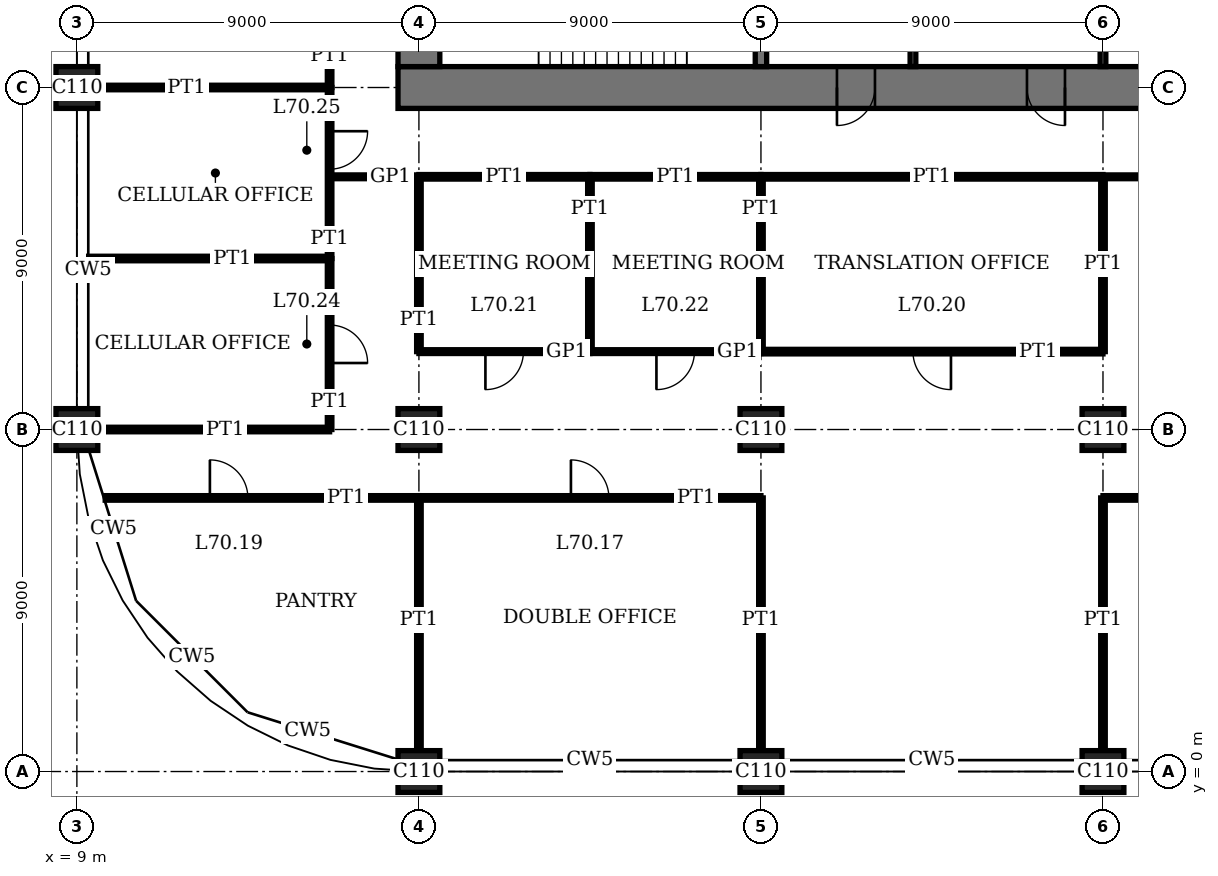
"""IFC4 building model, lengths in metres.
Left out: names, types, materials, properties, quantities, classifications, styles, units other than length and angle.
Written with IfcOpenShell. Run it as: python <this file> out.ifc"""

import sys

from ifc_helpers import new_model, si_unit, direction, frame, frame_2d, origin, origin_2d, place, context, subcontext, project, spatial, rectangle, extrude, element, fill, save


model = new_model("IFC4")
c1 = context("Model", 3, precision=1e-05, world=origin(), true_north=direction((0.0, 1.0)))
c2 = subcontext(c1, "Body", "Model", "MODEL_VIEW")
j1 = project(units=[si_unit("LENGTHUNIT", "METRE"), si_unit("PLANEANGLEUNIT", "RADIAN")], contexts=[c1])
p1 = place(None, origin())
s1 = spatial("IfcSite", under=j1, at=p1, CompositionType="ELEMENT")
p2 = place(p1, origin())
s2 = spatial("IfcBuilding", under=s1, at=p2, CompositionType="ELEMENT")
p3 = place(p2, frame((0.0, 0.0, 287.4)))
s3 = spatial("IfcBuildingStorey", under=s2, at=p3, CompositionType="ELEMENT", Elevation=287.4)
for number, where, z_axis, x_axis in (
    (1, (9.0, 9.0, 0.0), (0.0, 0.0, 1.0), (1.0, 0.0, 0.0)),
    (2, (9.0, 18.0, 0.0), (0.0, 0.0, 1.0), (1.0, 0.0, 0.0)),
    (3, (18.0, 0.0, 0.0), (0.0, 0.0, 1.0), (1.0, 0.0, 0.0)),
    (4, (18.0, 9.0, 0.0), (0.0, 0.0, 1.0), (1.0, 0.0, 0.0)),
    (5, (27.0, 0.0, 0.0), (0.0, 0.0, 1.0), (1.0, 0.0, 0.0)),
    (6, (27.0, 9.0, 0.0), (0.0, 0.0, 1.0), (1.0, 0.0, 0.0)),
    (7, (36.0, 0.0, 0.0), (0.0, 0.0, 1.0), (1.0, 0.0, 0.0)),
    (8, (36.0, 9.0, 0.0), (0.0, 0.0, 1.0), (1.0, 0.0, 0.0)),
):
    element("IfcColumn", number, at=place(p3, frame(where, z_axis=z_axis, x_axis=x_axis)), inside=s3, PredefinedType="COLUMN", context=c2, shape_type="SweptSolid", body=[
        extrude(rectangle(XDim=1.1, YDim=1.1, at=origin_2d()), origin(), (0.0, 0.0, 1.0), 4.0),
    ])
p4 = place(p3, frame((17.45, 18.0, 0.0), z_axis=(0.0, 0.0, 1.0), x_axis=(1.0, 0.0, 0.0)))
e9 = element("IfcWall", 9, at=p4, inside=s3, PredefinedType="SHEAR", context=c2, shape_type="SweptSolid", body=[
    extrude(rectangle(XDim=28.1, YDim=1.1, at=frame_2d((14.05, 0.0))), origin(), (0.0, 0.0, 1.0), 4.0),
])
p5 = place(p4, frame((11.55, 0.0, 0.0)))
e10 = element("IfcOpeningElement", 10, at=p5, cuts=e9, PredefinedType="OPENING", context=c2, shape_type="SweptSolid", body=[
    extrude(rectangle(XDim=1.0, YDim=2.4, at=frame_2d((0.5, 1.2))), frame((0.0, 0.56, 0.0), z_axis=(0.0, -1.0, 0.0), x_axis=(1.0, 0.0, 0.0)), (0.0, 0.0, 1.0), 1.12),
])
p6 = place(p4, frame((16.55, 0.0, 0.0)))
e11 = element("IfcOpeningElement", 11, at=p6, cuts=e9, PredefinedType="OPENING", context=c2, shape_type="SweptSolid", body=[
    extrude(rectangle(XDim=1.0, YDim=2.4, at=frame_2d((0.5, 1.2))), frame((0.0, 0.56, 0.0), z_axis=(0.0, -1.0, 0.0), x_axis=(1.0, 0.0, 0.0)), (0.0, 0.0, 1.0), 1.12),
])
p7 = place(p4, frame((20.0, 0.0, 0.0)))
e12 = element("IfcOpeningElement", 12, at=p7, cuts=e9, PredefinedType="OPENING", context=c2, shape_type="SweptSolid", body=[
    extrude(rectangle(XDim=1.1, YDim=2.4, at=frame_2d((0.55, 1.2))), frame((0.0, 0.56, 0.0), z_axis=(0.0, -1.0, 0.0), x_axis=(1.0, 0.0, 0.0)), (0.0, 0.0, 1.0), 1.12),
])
p8 = place(p4, frame((24.05, 0.0, 0.0)))
e13 = element("IfcOpeningElement", 13, at=p8, cuts=e9, PredefinedType="OPENING", context=c2, shape_type="SweptSolid", body=[
    extrude(rectangle(XDim=1.0, YDim=2.4, at=frame_2d((0.5, 1.2))), frame((0.0, 0.56, 0.0), z_axis=(0.0, -1.0, 0.0), x_axis=(1.0, 0.0, 0.0)), (0.0, 0.0, 1.0), 1.12),
])
p9 = place(p3, frame((18.0, 35.45, 0.0), z_axis=(0.0, 0.0, 1.0), x_axis=(0.0, -1.0, 0.0)))
e14 = element("IfcWall", 14, at=p9, inside=s3, PredefinedType="SHEAR", context=c2, shape_type="SweptSolid", body=[
    extrude(rectangle(XDim=16.9, YDim=1.1, at=frame_2d((8.45, 0.0))), origin(), (0.0, 0.0, 1.0), 4.0),
])
p10 = place(p9, frame((8.45, 0.0, 0.0)))
e15 = element("IfcOpeningElement", 15, at=p10, cuts=e14, PredefinedType="OPENING", context=c2, shape_type="SweptSolid", body=[
    extrude(rectangle(XDim=1.8, YDim=2.4, at=frame_2d((0.9, 1.2))), frame((0.0, 0.56, 0.0), z_axis=(0.0, -1.0, 0.0), x_axis=(1.0, 0.0, 0.0)), (0.0, 0.0, 1.0), 1.12),
])
p11 = place(p3, frame((27.0, 18.55, 0.0), z_axis=(0.0, 0.0, 1.0), x_axis=(0.0, 1.0, 0.0)))
e16 = element("IfcWall", 16, at=p11, inside=s3, PredefinedType="SHEAR", context=c2, shape_type="SweptSolid", body=[
    extrude(rectangle(XDim=3.05, YDim=0.3, at=frame_2d((1.525, 0.0))), origin(), (0.0, 0.0, 1.0), 4.0),
])
p12 = place(p3, frame((18.0, 7.2, 0.0), z_axis=(0.0, 0.0, 1.0), x_axis=(1.0, 0.0, 0.0)))
e17 = element("IfcWall", 17, at=p12, inside=s3, PredefinedType="PARTITIONING", context=c2, shape_type="SweptSolid", body=[
    extrude(rectangle(XDim=9.0, YDim=0.12, at=frame_2d((4.5, 0.0))), origin(), (0.0, 0.0, 1.0), 3.75),
])
p13 = place(p12, frame((4.0, 0.0, 0.0)))
e18 = element("IfcOpeningElement", 18, at=p13, cuts=e17, PredefinedType="OPENING", context=c2, shape_type="SweptSolid", body=[
    extrude(rectangle(XDim=1.0, YDim=2.4, at=frame_2d((0.5, 1.2))), frame((0.0, 0.07, 0.0), z_axis=(0.0, -1.0, 0.0), x_axis=(1.0, 0.0, 0.0)), (0.0, 0.0, 1.0), 0.14),
])
p14 = place(p3, frame((36.0, 7.2, 0.0), z_axis=(0.0, 0.0, 1.0), x_axis=(1.0, 0.0, 0.0)))
e19 = element("IfcWall", 19, at=p14, inside=s3, PredefinedType="PARTITIONING", context=c2, shape_type="SweptSolid", body=[
    extrude(rectangle(XDim=9.0, YDim=0.12, at=frame_2d((4.5, 0.0))), origin(), (0.0, 0.0, 1.0), 3.75),
])
p15 = place(p14, frame((4.0, 0.0, 0.0)))
e20 = element("IfcOpeningElement", 20, at=p15, cuts=e19, PredefinedType="OPENING", context=c2, shape_type="SweptSolid", body=[
    extrude(rectangle(XDim=1.0, YDim=2.4, at=frame_2d((0.5, 1.2))), frame((0.0, 0.07, 0.0), z_axis=(0.0, -1.0, 0.0), x_axis=(1.0, 0.0, 0.0)), (0.0, 0.0, 1.0), 0.14),
])
p16 = place(p3, frame((9.745, 7.2, 0.0), z_axis=(0.0, 0.0, 1.0), x_axis=(1.0, 0.0, 0.0)))
e21 = element("IfcWall", 21, at=p16, inside=s3, PredefinedType="PARTITIONING", context=c2, shape_type="SweptSolid", body=[
    extrude(rectangle(XDim=8.255, YDim=0.12, at=frame_2d((4.127, 0.0))), origin(), (0.0, 0.0, 1.0), 3.75),
])
p17 = place(p16, frame((2.755, 0.0, 0.0)))
e22 = element("IfcOpeningElement", 22, at=p17, cuts=e21, PredefinedType="OPENING", context=c2, shape_type="SweptSolid", body=[
    extrude(rectangle(XDim=1.0, YDim=2.4, at=frame_2d((0.5, 1.2))), frame((0.0, 0.07, 0.0), z_axis=(0.0, -1.0, 0.0), x_axis=(1.0, 0.0, 0.0)), (0.0, 0.0, 1.0), 0.14),
])
p18 = place(p3, frame((9.55, 9.0, 0.0), z_axis=(0.0, 0.0, 1.0), x_axis=(1.0, 0.0, 0.0)))
e23 = element("IfcWall", 23, at=p18, inside=s3, PredefinedType="PARTITIONING", context=c2, shape_type="SweptSolid", body=[
    extrude(rectangle(XDim=6.1, YDim=0.12, at=frame_2d((3.05, 0.0))), origin(), (0.0, 0.0, 1.0), 3.05),
])
p19 = place(p3, frame((27.0, 11.05, 0.0), z_axis=(0.0, 0.0, 1.0), x_axis=(1.0, 0.0, 0.0)))
e24 = element("IfcWall", 24, at=p19, inside=s3, PredefinedType="PARTITIONING", context=c2, shape_type="SweptSolid", body=[
    extrude(rectangle(XDim=9.0, YDim=0.12, at=frame_2d((4.5, 0.0))), origin(), (0.0, 0.0, 1.0), 3.75),
])
p20 = place(p19, frame((4.0, 0.0, 0.0)))
e25 = element("IfcOpeningElement", 25, at=p20, cuts=e24, PredefinedType="OPENING", context=c2, shape_type="SweptSolid", body=[
    extrude(rectangle(XDim=1.0, YDim=2.4, at=frame_2d((0.5, 1.2))), frame((0.0, 0.07, 0.0), z_axis=(0.0, -1.0, 0.0), x_axis=(1.0, 0.0, 0.0)), (0.0, 0.0, 1.0), 0.14),
])
p21 = place(p3, frame((18.0, 11.05, 0.0), z_axis=(0.0, 0.0, 1.0), x_axis=(1.0, 0.0, 0.0)))
e26 = element("IfcWall", 26, at=p21, inside=s3, PredefinedType="PARTITIONING", context=c2, shape_type="SweptSolid", body=[
    extrude(rectangle(XDim=4.5, YDim=0.1, at=frame_2d((2.25, 0.0))), origin(), (0.0, 0.0, 1.0), 3.75),
])
p22 = place(p21, frame((1.75, 0.0, 0.0)))
e27 = element("IfcOpeningElement", 27, at=p22, cuts=e26, PredefinedType="OPENING", context=c2, shape_type="SweptSolid", body=[
    extrude(rectangle(XDim=1.0, YDim=2.4, at=frame_2d((0.5, 1.2))), frame((0.0, 0.06, 0.0), z_axis=(0.0, -1.0, 0.0), x_axis=(1.0, 0.0, 0.0)), (0.0, 0.0, 1.0), 0.12),
])
p23 = place(p3, frame((22.5, 11.05, 0.0), z_axis=(0.0, 0.0, 1.0), x_axis=(1.0, 0.0, 0.0)))
e28 = element("IfcWall", 28, at=p23, inside=s3, PredefinedType="PARTITIONING", context=c2, shape_type="SweptSolid", body=[
    extrude(rectangle(XDim=4.5, YDim=0.1, at=frame_2d((2.25, 0.0))), origin(), (0.0, 0.0, 1.0), 3.75),
])
p24 = place(p23, frame((1.75, 0.0, 0.0)))
e29 = element("IfcOpeningElement", 29, at=p24, cuts=e28, PredefinedType="OPENING", context=c2, shape_type="SweptSolid", body=[
    extrude(rectangle(XDim=1.0, YDim=2.4, at=frame_2d((0.5, 1.2))), frame((0.0, 0.06, 0.0), z_axis=(0.0, -1.0, 0.0), x_axis=(1.0, 0.0, 0.0)), (0.0, 0.0, 1.0), 0.12),
])
p25 = place(p3, frame((9.31, 13.5, 0.0), z_axis=(0.0, 0.0, 1.0), x_axis=(1.0, 0.0, 0.0)))
e30 = element("IfcWall", 30, at=p25, inside=s3, PredefinedType="PARTITIONING", context=c2, shape_type="SweptSolid", body=[
    extrude(rectangle(XDim=6.34, YDim=0.12, at=frame_2d((3.17, 0.0))), origin(), (0.0, 0.0, 1.0), 3.1),
])
p26 = place(p3, frame((27.0, 15.65, 0.0), z_axis=(0.0, 0.0, 1.0), x_axis=(1.0, 0.0, 0.0)))
e31 = element("IfcWall", 31, at=p26, inside=s3, PredefinedType="PARTITIONING", context=c2, shape_type="SweptSolid", body=[
    extrude(rectangle(XDim=9.0, YDim=0.12, at=frame_2d((4.5, 0.0))), origin(), (0.0, 0.0, 1.0), 3.75),
])
for number, where, z_axis, x_axis in (
    (32, (18.0, 15.65, 0.0), (0.0, 0.0, 1.0), (1.0, 0.0, 0.0)),
    (33, (22.5, 15.65, 0.0), (0.0, 0.0, 1.0), (1.0, 0.0, 0.0)),
):
    element("IfcWall", number, at=place(p3, frame(where, z_axis=z_axis, x_axis=x_axis)), inside=s3, PredefinedType="PARTITIONING", context=c2, shape_type="SweptSolid", body=[
        extrude(rectangle(XDim=4.5, YDim=0.12, at=frame_2d((2.25, 0.0))), origin(), (0.0, 0.0, 1.0), 3.75),
    ])
p27 = place(p3, frame((36.01, 15.65, 0.0), z_axis=(0.0, 0.0, 1.0), x_axis=(1.0, 0.0, 0.0)))
e34 = element("IfcWall", 34, at=p27, inside=s3, PredefinedType="PARTITIONING", context=c2, shape_type="SweptSolid", body=[
    extrude(rectangle(XDim=11.33, YDim=0.1, at=frame_2d((5.665, 0.0))), origin(), (0.0, 0.0, 1.0), 3.75),
])
p28 = place(p27, frame((5.165, 0.0, 0.0)))
e35 = element("IfcOpeningElement", 35, at=p28, cuts=e34, PredefinedType="OPENING", context=c2, shape_type="SweptSolid", body=[
    extrude(rectangle(XDim=1.0, YDim=2.4, at=frame_2d((0.5, 1.2))), frame((0.0, 0.06, 0.0), z_axis=(0.0, -1.0, 0.0), x_axis=(1.0, 0.0, 0.0)), (0.0, 0.0, 1.0), 0.12),
])
p29 = place(p3, frame((15.66, 15.65, 0.0), z_axis=(0.0, 0.0, 1.0), x_axis=(1.0, 0.0, 0.0)))
e36 = element("IfcWall", 36, at=p29, inside=s3, PredefinedType="PARTITIONING", context=c2, shape_type="SweptSolid", body=[
    extrude(rectangle(XDim=2.33, YDim=0.1, at=frame_2d((1.165, 0.0))), origin(), (0.0, 0.0, 1.0), 3.75),
])
p30 = place(p3, frame((9.55, 18.0, 0.0), z_axis=(0.0, 0.0, 1.0), x_axis=(1.0, 0.0, 0.0)))
e37 = element("IfcWall", 37, at=p30, inside=s3, PredefinedType="PARTITIONING", context=c2, shape_type="SweptSolid", body=[
    extrude(rectangle(XDim=6.1, YDim=0.12, at=frame_2d((3.05, 0.0))), origin(), (0.0, 0.0, 1.0), 3.05),
])
p31 = place(p3, frame((15.65, 9.0, 0.0), z_axis=(0.0, 0.0, 1.0), x_axis=(0.0, 1.0, 0.0)))
e38 = element("IfcWall", 38, at=p31, inside=s3, PredefinedType="PARTITIONING", context=c2, shape_type="SweptSolid", body=[
    extrude(rectangle(XDim=4.5, YDim=0.12, at=frame_2d((2.25, 0.0))), origin(), (0.0, 0.0, 1.0), 3.75),
])
p32 = place(p31, frame((1.75, 0.0, 0.0)))
e39 = element("IfcOpeningElement", 39, at=p32, cuts=e38, PredefinedType="OPENING", context=c2, shape_type="SweptSolid", body=[
    extrude(rectangle(XDim=1.0, YDim=2.4, at=frame_2d((0.5, 1.2))), frame((0.0, 0.07, 0.0), z_axis=(0.0, -1.0, 0.0), x_axis=(1.0, 0.0, 0.0)), (0.0, 0.0, 1.0), 0.14),
])
p33 = place(p3, frame((15.65, 13.5, 0.0), z_axis=(0.0, 0.0, 1.0), x_axis=(0.0, 1.0, 0.0)))
e40 = element("IfcWall", 40, at=p33, inside=s3, PredefinedType="PARTITIONING", context=c2, shape_type="SweptSolid", body=[
    extrude(rectangle(XDim=4.5, YDim=0.12, at=frame_2d((2.25, 0.0))), origin(), (0.0, 0.0, 1.0), 3.75),
])
p34 = place(p33, frame((2.35, 0.0, 0.0)))
e41 = element("IfcOpeningElement", 41, at=p34, cuts=e40, PredefinedType="OPENING", context=c2, shape_type="SweptSolid", body=[
    extrude(rectangle(XDim=1.0, YDim=2.4, at=frame_2d((0.5, 1.2))), frame((0.0, 0.07, 0.0), z_axis=(0.0, -1.0, 0.0), x_axis=(1.0, 0.0, 0.0)), (0.0, 0.0, 1.0), 0.14),
])
p35 = place(p3, frame((15.65, 18.0, 0.0), z_axis=(0.0, 0.0, 1.0), x_axis=(0.0, 1.0, 0.0)))
e42 = element("IfcWall", 42, at=p35, inside=s3, PredefinedType="PARTITIONING", context=c2, shape_type="SweptSolid", body=[
    extrude(rectangle(XDim=4.5, YDim=0.12, at=frame_2d((2.25, 0.0))), origin(), (0.0, 0.0, 1.0), 3.75),
])
p36 = place(p35, frame((1.75, 0.0, 0.0)))
e43 = element("IfcOpeningElement", 43, at=p36, cuts=e42, PredefinedType="OPENING", context=c2, shape_type="SweptSolid", body=[
    extrude(rectangle(XDim=1.0, YDim=2.4, at=frame_2d((0.5, 1.2))), frame((0.0, 0.07, 0.0), z_axis=(0.0, -1.0, 0.0), x_axis=(1.0, 0.0, 0.0)), (0.0, 0.0, 1.0), 0.14),
])
p37 = place(p3, frame((18.0, 0.55, 0.0), z_axis=(0.0, 0.0, 1.0), x_axis=(0.0, 1.0, 0.0)))
e44 = element("IfcWall", 44, at=p37, inside=s3, PredefinedType="PARTITIONING", context=c2, shape_type="SweptSolid", body=[
    extrude(rectangle(XDim=6.65, YDim=0.12, at=frame_2d((3.325, 0.0))), origin(), (0.0, 0.0, 1.0), 3.05),
])
p38 = place(p3, frame((18.0, 11.05, 0.0), z_axis=(0.0, 0.0, 1.0), x_axis=(0.0, 1.0, 0.0)))
e45 = element("IfcWall", 45, at=p38, inside=s3, PredefinedType="PARTITIONING", context=c2, shape_type="SweptSolid", body=[
    extrude(rectangle(XDim=4.6, YDim=0.12, at=frame_2d((2.3, 0.0))), origin(), (0.0, 0.0, 1.0), 3.05),
])
p39 = place(p3, frame((22.5, 11.05, 0.0), z_axis=(0.0, 0.0, 1.0), x_axis=(0.0, 1.0, 0.0)))
e46 = element("IfcWall", 46, at=p39, inside=s3, PredefinedType="PARTITIONING", context=c2, shape_type="SweptSolid", body=[
    extrude(rectangle(XDim=4.6, YDim=0.12, at=frame_2d((2.3, 0.0))), origin(), (0.0, 0.0, 1.0), 3.75),
])
p40 = place(p3, frame((27.0, 0.55, 0.0), z_axis=(0.0, 0.0, 1.0), x_axis=(0.0, 1.0, 0.0)))
e47 = element("IfcWall", 47, at=p40, inside=s3, PredefinedType="PARTITIONING", context=c2, shape_type="SweptSolid", body=[
    extrude(rectangle(XDim=6.65, YDim=0.12, at=frame_2d((3.325, 0.0))), origin(), (0.0, 0.0, 1.0), 3.05),
])
p41 = place(p3, frame((27.0, 11.05, 0.0), z_axis=(0.0, 0.0, 1.0), x_axis=(0.0, 1.0, 0.0)))
e48 = element("IfcWall", 48, at=p41, inside=s3, PredefinedType="PARTITIONING", context=c2, shape_type="SweptSolid", body=[
    extrude(rectangle(XDim=4.6, YDim=0.12, at=frame_2d((2.3, 0.0))), origin(), (0.0, 0.0, 1.0), 3.05),
])
p42 = place(p3, frame((36.0, 0.55, 0.0), z_axis=(0.0, 0.0, 1.0), x_axis=(0.0, 1.0, 0.0)))
e49 = element("IfcWall", 49, at=p42, inside=s3, PredefinedType="PARTITIONING", context=c2, shape_type="SweptSolid", body=[
    extrude(rectangle(XDim=6.65, YDim=0.12, at=frame_2d((3.325, 0.0))), origin(), (0.0, 0.0, 1.0), 3.05),
])
p43 = place(p3, frame((36.0, 11.05, 0.0), z_axis=(0.0, 0.0, 1.0), x_axis=(0.0, 1.0, 0.0)))
e50 = element("IfcWall", 50, at=p43, inside=s3, PredefinedType="PARTITIONING", context=c2, shape_type="SweptSolid", body=[
    extrude(rectangle(XDim=4.6, YDim=0.12, at=frame_2d((2.3, 0.0))), origin(), (0.0, 0.0, 1.0), 3.05),
])
for number, where, z_axis, x_axis in (
    (51, (31.0, 18.55, 0.0), (0.0, 0.0, 1.0), (0.0, 1.0, 0.0)),
    (52, (36.0, 18.55, 0.0), (0.0, 0.0, 1.0), (0.0, 1.0, 0.0)),
):
    element("IfcWall", number, at=place(p3, frame(where, z_axis=z_axis, x_axis=x_axis)), inside=s3, PredefinedType="PARTITIONING", context=c2, shape_type="SweptSolid", body=[
        extrude(rectangle(XDim=2.9, YDim=0.15, at=frame_2d((1.45, 0.0))), origin(), (0.0, 0.0, 1.0), 3.75),
    ])
p44 = place(p5, origin())
e53 = element("IfcDoor", 53, at=p44, inside=s3, OperationType="SINGLE_SWING_LEFT", PredefinedType="DOOR", context=c2, shape_type="SweptSolid", body=[
    extrude(rectangle(XDim=1.0, YDim=2.4, at=frame_2d((0.5, 1.2))), frame((0.0, 0.025, 0.0), z_axis=(0.0, -1.0, 0.0), x_axis=(1.0, 0.0, 0.0)), (0.0, 0.0, 1.0), 0.05),
    extrude(rectangle(XDim=0.04, YDim=2.4, at=frame_2d((0.02, 1.2))), frame((0.0, 0.4, 0.0), z_axis=(0.0, -1.0, 0.0), x_axis=(1.0, 0.0, 0.0)), (0.0, 0.0, 1.0), 0.8),
    extrude(rectangle(XDim=0.04, YDim=2.4, at=frame_2d((0.98, 1.2))), frame((0.0, 0.4, 0.0), z_axis=(0.0, -1.0, 0.0), x_axis=(1.0, 0.0, 0.0)), (0.0, 0.0, 1.0), 0.8),
    extrude(rectangle(XDim=1.0, YDim=0.04, at=frame_2d((0.5, 2.38))), frame((0.0, 0.4, 0.0), z_axis=(0.0, -1.0, 0.0), x_axis=(1.0, 0.0, 0.0)), (0.0, 0.0, 1.0), 0.8),
])
fill(e10, e53)
p45 = place(p6, origin())
e54 = element("IfcDoor", 54, at=p45, inside=s3, OperationType="SINGLE_SWING_RIGHT", PredefinedType="DOOR", context=c2, shape_type="SweptSolid", body=[
    extrude(rectangle(XDim=1.0, YDim=2.4, at=frame_2d((0.5, 1.2))), frame((0.0, 0.025, 0.0), z_axis=(0.0, -1.0, 0.0), x_axis=(1.0, 0.0, 0.0)), (0.0, 0.0, 1.0), 0.05),
    extrude(rectangle(XDim=0.04, YDim=2.4, at=frame_2d((0.02, 1.2))), frame((0.0, 0.4, 0.0), z_axis=(0.0, -1.0, 0.0), x_axis=(1.0, 0.0, 0.0)), (0.0, 0.0, 1.0), 0.8),
    extrude(rectangle(XDim=0.04, YDim=2.4, at=frame_2d((0.98, 1.2))), frame((0.0, 0.4, 0.0), z_axis=(0.0, -1.0, 0.0), x_axis=(1.0, 0.0, 0.0)), (0.0, 0.0, 1.0), 0.8),
    extrude(rectangle(XDim=1.0, YDim=0.04, at=frame_2d((0.5, 2.38))), frame((0.0, 0.4, 0.0), z_axis=(0.0, -1.0, 0.0), x_axis=(1.0, 0.0, 0.0)), (0.0, 0.0, 1.0), 0.8),
])
fill(e11, e54)
p46 = place(p13, origin())
e55 = element("IfcDoor", 55, at=p46, inside=s3, OperationType="SINGLE_SWING_RIGHT", PredefinedType="DOOR", context=c2, shape_type="SweptSolid", body=[
    extrude(rectangle(XDim=1.0, YDim=2.4, at=frame_2d((0.5, 1.2))), frame((0.0, 0.025, 0.0), z_axis=(0.0, -1.0, 0.0), x_axis=(1.0, 0.0, 0.0)), (0.0, 0.0, 1.0), 0.05),
])
fill(e18, e55)
p47 = place(p17, origin())
e56 = element("IfcDoor", 56, at=p47, inside=s3, OperationType="SINGLE_SWING_RIGHT", PredefinedType="DOOR", context=c2, shape_type="SweptSolid", body=[
    extrude(rectangle(XDim=1.0, YDim=2.4, at=frame_2d((0.5, 1.2))), frame((0.0, 0.025, 0.0), z_axis=(0.0, -1.0, 0.0), x_axis=(1.0, 0.0, 0.0)), (0.0, 0.0, 1.0), 0.05),
])
fill(e22, e56)
p48 = place(p20, origin())
e57 = element("IfcDoor", 57, at=p48, inside=s3, OperationType="SINGLE_SWING_RIGHT", PredefinedType="DOOR", context=c2, shape_type="SweptSolid", body=[
    extrude(rectangle(XDim=1.0, YDim=2.4, at=frame_2d((0.5, 1.2))), frame((0.0, 0.025, 0.0), z_axis=(0.0, -1.0, 0.0), x_axis=(1.0, 0.0, 0.0)), (0.0, 0.0, 1.0), 0.05),
])
fill(e25, e57)
p49 = place(p22, origin())
e58 = element("IfcDoor", 58, at=p49, inside=s3, OperationType="SINGLE_SWING_LEFT", PredefinedType="DOOR", context=c2, shape_type="SweptSolid", body=[
    extrude(rectangle(XDim=1.0, YDim=2.4, at=frame_2d((0.5, 1.2))), frame((0.0, 0.02, 0.0), z_axis=(0.0, -1.0, 0.0), x_axis=(1.0, 0.0, 0.0)), (0.0, 0.0, 1.0), 0.04),
])
fill(e27, e58)
p50 = place(p24, origin())
e59 = element("IfcDoor", 59, at=p50, inside=s3, OperationType="SINGLE_SWING_LEFT", PredefinedType="DOOR", context=c2, shape_type="SweptSolid", body=[
    extrude(rectangle(XDim=1.0, YDim=2.4, at=frame_2d((0.5, 1.2))), frame((0.0, 0.02, 0.0), z_axis=(0.0, -1.0, 0.0), x_axis=(1.0, 0.0, 0.0)), (0.0, 0.0, 1.0), 0.04),
])
fill(e29, e59)
p51 = place(p32, origin())
e60 = element("IfcDoor", 60, at=p51, inside=s3, OperationType="SINGLE_SWING_LEFT", PredefinedType="DOOR", context=c2, shape_type="SweptSolid", body=[
    extrude(rectangle(XDim=1.0, YDim=2.4, at=frame_2d((0.5, 1.2))), frame((0.0, 0.025, 0.0), z_axis=(0.0, -1.0, 0.0), x_axis=(1.0, 0.0, 0.0)), (0.0, 0.0, 1.0), 0.05),
])
fill(e39, e60)
p52 = place(p34, origin())
e61 = element("IfcDoor", 61, at=p52, inside=s3, OperationType="SINGLE_SWING_RIGHT", PredefinedType="DOOR", context=c2, shape_type="SweptSolid", body=[
    extrude(rectangle(XDim=1.0, YDim=2.4, at=frame_2d((0.5, 1.2))), frame((0.0, 0.025, 0.0), z_axis=(0.0, -1.0, 0.0), x_axis=(1.0, 0.0, 0.0)), (0.0, 0.0, 1.0), 0.05),
])
fill(e41, e61)
save(model, sys.argv[1])
